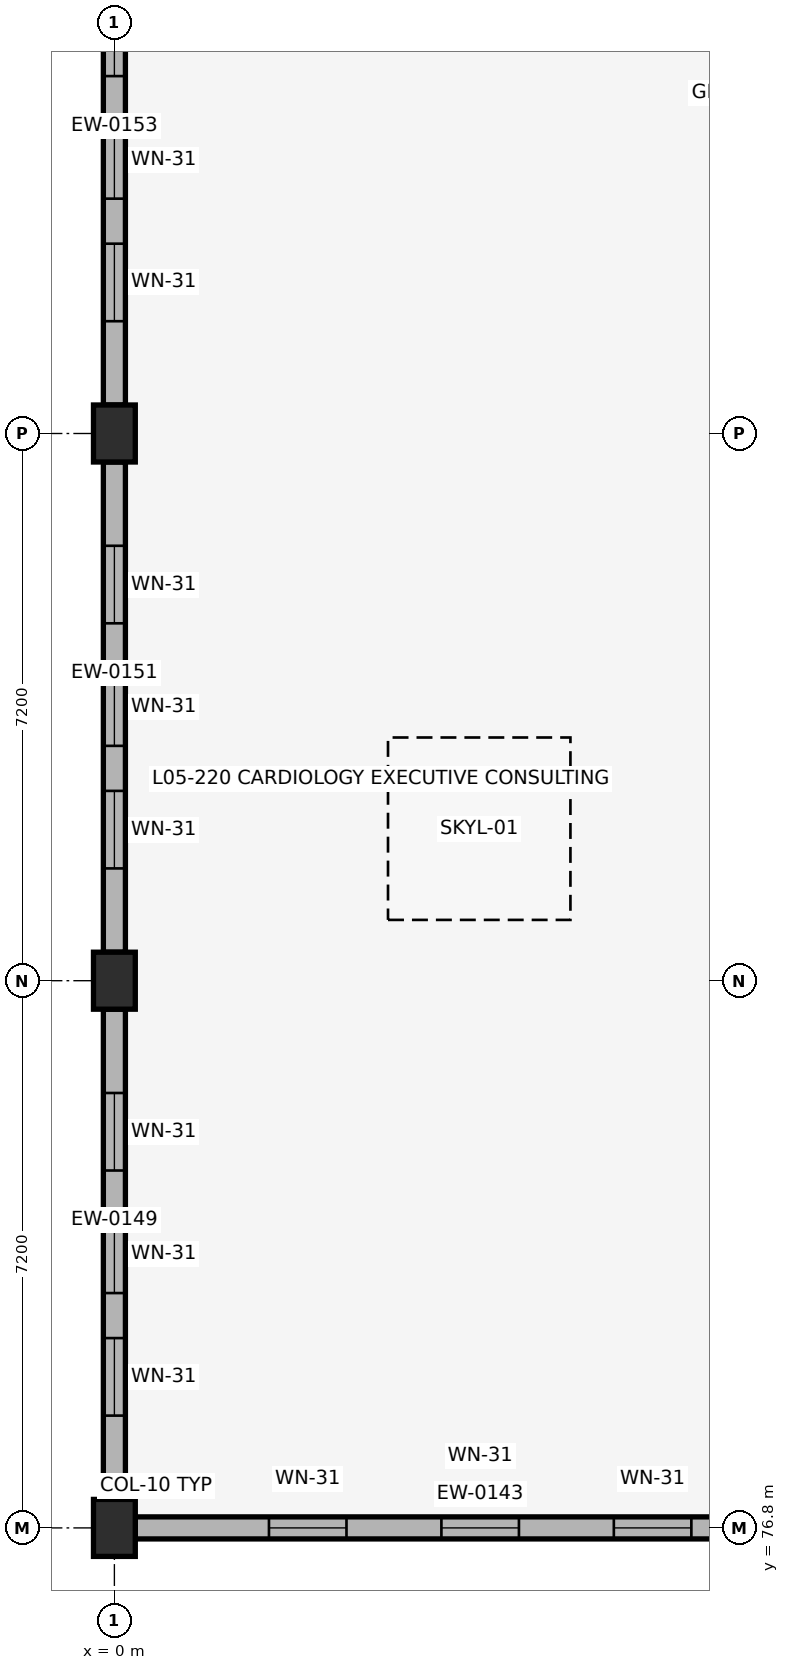
"""IFC4 building model, lengths in metres.
Left out: names, types, materials, properties, quantities, classifications, styles, units other than length and angle.
Written with IfcOpenShell. Run it as: python <this file> out.ifc"""

import sys

from ifc_helpers import new_model, si_unit, direction, frame, frame_2d, origin, origin_2d, place, context, subcontext, project, spatial, rectangle, extrude, element, fill, save


model = new_model("IFC4")
c1 = context("Model", 3, precision=1e-05, world=origin(), true_north=direction((0.0, 1.0)))
c2 = subcontext(c1, "Body", "Model", "MODEL_VIEW")
j1 = project(units=[si_unit("LENGTHUNIT", "METRE"), si_unit("PLANEANGLEUNIT", "RADIAN")], contexts=[c1])
p1 = place(None, origin())
s1 = spatial("IfcSite", under=j1, at=p1, CompositionType="ELEMENT")
p2 = place(p1, origin())
s2 = spatial("IfcBuilding", under=s1, at=p2, CompositionType="ELEMENT")
p3 = place(p2, frame((0.0, 0.0, 20.74)))
s3 = spatial("IfcBuildingStorey", under=s2, at=p3, CompositionType="ELEMENT", Elevation=20.74)
for number, where, z_axis, x_axis in (
    (1, (0.0, 76.8, 0.0), (0.0, 0.0, 1.0), (1.0, 0.0, 0.0)),
    (2, (0.0, 84.0, 0.0), (0.0, 0.0, 1.0), (1.0, 0.0, 0.0)),
    (3, (0.0, 91.2, 0.0), (0.0, 0.0, 1.0), (1.0, 0.0, 0.0)),
):
    element("IfcColumn", number, at=place(p3, frame(where, z_axis=z_axis, x_axis=x_axis)), inside=s3, PredefinedType="COLUMN", context=c2, shape_type="SweptSolid", body=[
        extrude(rectangle(XDim=0.55, YDim=0.75, at=origin_2d()), origin(), (0.0, 0.0, 1.0), 4.08),
    ])
p4 = place(p3, frame((0.275, 76.8, 0.0), z_axis=(0.0, 0.0, 1.0), x_axis=(1.0, 0.0, 0.0)))
e4 = element("IfcWall", 4, at=p4, inside=s3, PredefinedType="SOLIDWALL", context=c2, shape_type="SweptSolid", body=[
    extrude(rectangle(XDim=9.075, YDim=0.29, at=frame_2d((4.538, 0.0))), origin(), (0.0, 0.0, 1.0), 3.07),
])
p5 = place(p4, frame((1.759, 0.0, 0.88)))
e5 = element("IfcOpeningElement", 5, at=p5, cuts=e4, PredefinedType="OPENING", context=c2, shape_type="SweptSolid", body=[
    extrude(rectangle(XDim=1.02, YDim=1.88, at=frame_2d((0.51, 0.94))), frame((0.0, 0.155, 0.0), z_axis=(0.0, -1.0, 0.0), x_axis=(1.0, 0.0, 0.0)), (0.0, 0.0, 1.0), 0.31),
])
p6 = place(p4, frame((4.028, 0.0, 0.88)))
e6 = element("IfcOpeningElement", 6, at=p6, cuts=e4, PredefinedType="OPENING", context=c2, shape_type="SweptSolid", body=[
    extrude(rectangle(XDim=1.02, YDim=1.88, at=frame_2d((0.51, 0.94))), frame((0.0, 0.155, 0.0), z_axis=(0.0, -1.0, 0.0), x_axis=(1.0, 0.0, 0.0)), (0.0, 0.0, 1.0), 0.31),
])
p7 = place(p4, frame((6.296, 0.0, 0.88)))
e7 = element("IfcOpeningElement", 7, at=p7, cuts=e4, PredefinedType="OPENING", context=c2, shape_type="SweptSolid", body=[
    extrude(rectangle(XDim=1.02, YDim=1.88, at=frame_2d((0.51, 0.94))), frame((0.0, 0.155, 0.0), z_axis=(0.0, -1.0, 0.0), x_axis=(1.0, 0.0, 0.0)), (0.0, 0.0, 1.0), 0.31),
])
p8 = place(p3, frame((0.0, 83.625, 0.0), z_axis=(0.0, 0.0, 1.0), x_axis=(0.0, -1.0, 0.0)))
e8 = element("IfcWall", 8, at=p8, inside=s3, PredefinedType="SOLIDWALL", context=c2, shape_type="SweptSolid", body=[
    extrude(rectangle(XDim=6.45, YDim=0.29, at=frame_2d((3.225, 0.0))), origin(), (0.0, 0.0, 1.0), 3.07),
])
p9 = place(p8, frame((1.103, 0.0, 0.88)))
e9 = element("IfcOpeningElement", 9, at=p9, cuts=e8, PredefinedType="OPENING", context=c2, shape_type="SweptSolid", body=[
    extrude(rectangle(XDim=1.02, YDim=1.88, at=frame_2d((0.51, 0.94))), frame((0.0, 0.155, 0.0), z_axis=(0.0, -1.0, 0.0), x_axis=(1.0, 0.0, 0.0)), (0.0, 0.0, 1.0), 0.31),
])
p10 = place(p8, frame((2.715, 0.0, 0.88)))
e10 = element("IfcOpeningElement", 10, at=p10, cuts=e8, PredefinedType="OPENING", context=c2, shape_type="SweptSolid", body=[
    extrude(rectangle(XDim=1.02, YDim=1.88, at=frame_2d((0.51, 0.94))), frame((0.0, 0.155, 0.0), z_axis=(0.0, -1.0, 0.0), x_axis=(1.0, 0.0, 0.0)), (0.0, 0.0, 1.0), 0.31),
])
p11 = place(p8, frame((4.327, 0.0, 0.88)))
e11 = element("IfcOpeningElement", 11, at=p11, cuts=e8, PredefinedType="OPENING", context=c2, shape_type="SweptSolid", body=[
    extrude(rectangle(XDim=1.02, YDim=1.88, at=frame_2d((0.51, 0.94))), frame((0.0, 0.155, 0.0), z_axis=(0.0, -1.0, 0.0), x_axis=(1.0, 0.0, 0.0)), (0.0, 0.0, 1.0), 0.31),
])
p12 = place(p3, frame((0.0, 90.825, 0.0), z_axis=(0.0, 0.0, 1.0), x_axis=(0.0, -1.0, 0.0)))
e12 = element("IfcWall", 12, at=p12, inside=s3, PredefinedType="SOLIDWALL", context=c2, shape_type="SweptSolid", body=[
    extrude(rectangle(XDim=6.45, YDim=0.29, at=frame_2d((3.225, 0.0))), origin(), (0.0, 0.0, 1.0), 3.07),
])
p13 = place(p12, frame((1.103, 0.0, 0.88)))
e13 = element("IfcOpeningElement", 13, at=p13, cuts=e12, PredefinedType="OPENING", context=c2, shape_type="SweptSolid", body=[
    extrude(rectangle(XDim=1.02, YDim=1.88, at=frame_2d((0.51, 0.94))), frame((0.0, 0.155, 0.0), z_axis=(0.0, -1.0, 0.0), x_axis=(1.0, 0.0, 0.0)), (0.0, 0.0, 1.0), 0.31),
])
p14 = place(p12, frame((2.715, 0.0, 0.88)))
e14 = element("IfcOpeningElement", 14, at=p14, cuts=e12, PredefinedType="OPENING", context=c2, shape_type="SweptSolid", body=[
    extrude(rectangle(XDim=1.02, YDim=1.88, at=frame_2d((0.51, 0.94))), frame((0.0, 0.155, 0.0), z_axis=(0.0, -1.0, 0.0), x_axis=(1.0, 0.0, 0.0)), (0.0, 0.0, 1.0), 0.31),
])
p15 = place(p12, frame((4.327, 0.0, 0.88)))
e15 = element("IfcOpeningElement", 15, at=p15, cuts=e12, PredefinedType="OPENING", context=c2, shape_type="SweptSolid", body=[
    extrude(rectangle(XDim=1.02, YDim=1.88, at=frame_2d((0.51, 0.94))), frame((0.0, 0.155, 0.0), z_axis=(0.0, -1.0, 0.0), x_axis=(1.0, 0.0, 0.0)), (0.0, 0.0, 1.0), 0.31),
])
p16 = place(p3, frame((0.0, 98.025, 0.0), z_axis=(0.0, 0.0, 1.0), x_axis=(0.0, -1.0, 0.0)))
e16 = element("IfcWall", 16, at=p16, inside=s3, PredefinedType="SOLIDWALL", context=c2, shape_type="SweptSolid", body=[
    extrude(rectangle(XDim=6.45, YDim=0.29, at=frame_2d((3.225, 0.0))), origin(), (0.0, 0.0, 1.0), 3.07),
])
p17 = place(p16, frame((1.103, 0.0, 0.88)))
e17 = element("IfcOpeningElement", 17, at=p17, cuts=e16, PredefinedType="OPENING", context=c2, shape_type="SweptSolid", body=[
    extrude(rectangle(XDim=1.02, YDim=1.88, at=frame_2d((0.51, 0.94))), frame((0.0, 0.155, 0.0), z_axis=(0.0, -1.0, 0.0), x_axis=(1.0, 0.0, 0.0)), (0.0, 0.0, 1.0), 0.31),
])
p18 = place(p16, frame((2.715, 0.0, 0.88)))
e18 = element("IfcOpeningElement", 18, at=p18, cuts=e16, PredefinedType="OPENING", context=c2, shape_type="SweptSolid", body=[
    extrude(rectangle(XDim=1.02, YDim=1.88, at=frame_2d((0.51, 0.94))), frame((0.0, 0.155, 0.0), z_axis=(0.0, -1.0, 0.0), x_axis=(1.0, 0.0, 0.0)), (0.0, 0.0, 1.0), 0.31),
])
p19 = place(p16, frame((4.327, 0.0, 0.88)))
e19 = element("IfcOpeningElement", 19, at=p19, cuts=e16, PredefinedType="OPENING", context=c2, shape_type="SweptSolid", body=[
    extrude(rectangle(XDim=1.02, YDim=1.88, at=frame_2d((0.51, 0.94))), frame((0.0, 0.155, 0.0), z_axis=(0.0, -1.0, 0.0), x_axis=(1.0, 0.0, 0.0)), (0.0, 0.0, 1.0), 0.31),
])
p20 = place(p5, origin())
e20 = element("IfcWindow", 20, at=p20, inside=s3, PartitioningType="SINGLE_PANEL", PredefinedType="WINDOW", context=c2, shape_type="SweptSolid", body=[
    extrude(rectangle(XDim=1.02, YDim=1.88, at=frame_2d((0.51, 0.94))), frame((0.0, 0.03, 0.0), z_axis=(0.0, -1.0, 0.0), x_axis=(1.0, 0.0, 0.0)), (0.0, 0.0, 1.0), 0.06),
])
fill(e5, e20)
p21 = place(p6, origin())
e21 = element("IfcWindow", 21, at=p21, inside=s3, PartitioningType="SINGLE_PANEL", PredefinedType="WINDOW", context=c2, shape_type="SweptSolid", body=[
    extrude(rectangle(XDim=1.02, YDim=1.88, at=frame_2d((0.51, 0.94))), frame((0.0, 0.03, 0.0), z_axis=(0.0, -1.0, 0.0), x_axis=(1.0, 0.0, 0.0)), (0.0, 0.0, 1.0), 0.06),
])
fill(e6, e21)
p22 = place(p7, origin())
e22 = element("IfcWindow", 22, at=p22, inside=s3, PartitioningType="SINGLE_PANEL", PredefinedType="WINDOW", context=c2, shape_type="SweptSolid", body=[
    extrude(rectangle(XDim=1.02, YDim=1.88, at=frame_2d((0.51, 0.94))), frame((0.0, 0.03, 0.0), z_axis=(0.0, -1.0, 0.0), x_axis=(1.0, 0.0, 0.0)), (0.0, 0.0, 1.0), 0.06),
])
fill(e7, e22)
p23 = place(p9, origin())
e23 = element("IfcWindow", 23, at=p23, inside=s3, PartitioningType="SINGLE_PANEL", PredefinedType="WINDOW", context=c2, shape_type="SweptSolid", body=[
    extrude(rectangle(XDim=1.02, YDim=1.88, at=frame_2d((0.51, 0.94))), frame((0.0, 0.03, 0.0), z_axis=(0.0, -1.0, 0.0), x_axis=(1.0, 0.0, 0.0)), (0.0, 0.0, 1.0), 0.06),
])
fill(e9, e23)
p24 = place(p10, origin())
e24 = element("IfcWindow", 24, at=p24, inside=s3, PartitioningType="SINGLE_PANEL", PredefinedType="WINDOW", context=c2, shape_type="SweptSolid", body=[
    extrude(rectangle(XDim=1.02, YDim=1.88, at=frame_2d((0.51, 0.94))), frame((0.0, 0.03, 0.0), z_axis=(0.0, -1.0, 0.0), x_axis=(1.0, 0.0, 0.0)), (0.0, 0.0, 1.0), 0.06),
])
fill(e10, e24)
p25 = place(p11, origin())
e25 = element("IfcWindow", 25, at=p25, inside=s3, PartitioningType="SINGLE_PANEL", PredefinedType="WINDOW", context=c2, shape_type="SweptSolid", body=[
    extrude(rectangle(XDim=1.02, YDim=1.88, at=frame_2d((0.51, 0.94))), frame((0.0, 0.03, 0.0), z_axis=(0.0, -1.0, 0.0), x_axis=(1.0, 0.0, 0.0)), (0.0, 0.0, 1.0), 0.06),
])
fill(e11, e25)
p26 = place(p13, origin())
e26 = element("IfcWindow", 26, at=p26, inside=s3, PartitioningType="SINGLE_PANEL", PredefinedType="WINDOW", context=c2, shape_type="SweptSolid", body=[
    extrude(rectangle(XDim=1.02, YDim=1.88, at=frame_2d((0.51, 0.94))), frame((0.0, 0.03, 0.0), z_axis=(0.0, -1.0, 0.0), x_axis=(1.0, 0.0, 0.0)), (0.0, 0.0, 1.0), 0.06),
])
fill(e13, e26)
p27 = place(p14, origin())
e27 = element("IfcWindow", 27, at=p27, inside=s3, PartitioningType="SINGLE_PANEL", PredefinedType="WINDOW", context=c2, shape_type="SweptSolid", body=[
    extrude(rectangle(XDim=1.02, YDim=1.88, at=frame_2d((0.51, 0.94))), frame((0.0, 0.03, 0.0), z_axis=(0.0, -1.0, 0.0), x_axis=(1.0, 0.0, 0.0)), (0.0, 0.0, 1.0), 0.06),
])
fill(e14, e27)
p28 = place(p15, origin())
e28 = element("IfcWindow", 28, at=p28, inside=s3, PartitioningType="SINGLE_PANEL", PredefinedType="WINDOW", context=c2, shape_type="SweptSolid", body=[
    extrude(rectangle(XDim=1.02, YDim=1.88, at=frame_2d((0.51, 0.94))), frame((0.0, 0.03, 0.0), z_axis=(0.0, -1.0, 0.0), x_axis=(1.0, 0.0, 0.0)), (0.0, 0.0, 1.0), 0.06),
])
fill(e15, e28)
p29 = place(p17, origin())
e29 = element("IfcWindow", 29, at=p29, inside=s3, PartitioningType="SINGLE_PANEL", PredefinedType="WINDOW", context=c2, shape_type="SweptSolid", body=[
    extrude(rectangle(XDim=1.02, YDim=1.88, at=frame_2d((0.51, 0.94))), frame((0.0, 0.03, 0.0), z_axis=(0.0, -1.0, 0.0), x_axis=(1.0, 0.0, 0.0)), (0.0, 0.0, 1.0), 0.06),
])
fill(e17, e29)
p30 = place(p18, origin())
e30 = element("IfcWindow", 30, at=p30, inside=s3, PartitioningType="SINGLE_PANEL", PredefinedType="WINDOW", context=c2, shape_type="SweptSolid", body=[
    extrude(rectangle(XDim=1.02, YDim=1.88, at=frame_2d((0.51, 0.94))), frame((0.0, 0.03, 0.0), z_axis=(0.0, -1.0, 0.0), x_axis=(1.0, 0.0, 0.0)), (0.0, 0.0, 1.0), 0.06),
])
fill(e18, e30)
p31 = place(p19, origin())
e31 = element("IfcWindow", 31, at=p31, inside=s3, PartitioningType="SINGLE_PANEL", PredefinedType="WINDOW", context=c2, shape_type="SweptSolid", body=[
    extrude(rectangle(XDim=1.02, YDim=1.88, at=frame_2d((0.51, 0.94))), frame((0.0, 0.03, 0.0), z_axis=(0.0, -1.0, 0.0), x_axis=(1.0, 0.0, 0.0)), (0.0, 0.0, 1.0), 0.06),
])
fill(e19, e31)
p32 = place(p2, frame((0.0, 0.0, 24.82)))
p33 = place(p32, frame((0.0, 0.0, -0.29)))
p34 = place(p33, frame((4.8, 86.0, 0.0)))
p35 = place(p34, frame((0.0, 0.0, 0.24)))
e32 = element("IfcWindow", 32, at=p35, inside=s3, PartitioningType="SINGLE_PANEL", PredefinedType="SKYLIGHT", context=c2, shape_type="SweptSolid", body=[
    extrude(rectangle(XDim=2.4, YDim=2.4, at=origin_2d()), origin(), (0.0, 0.0, 1.0), 0.05),
])
save(model, sys.argv[1])
